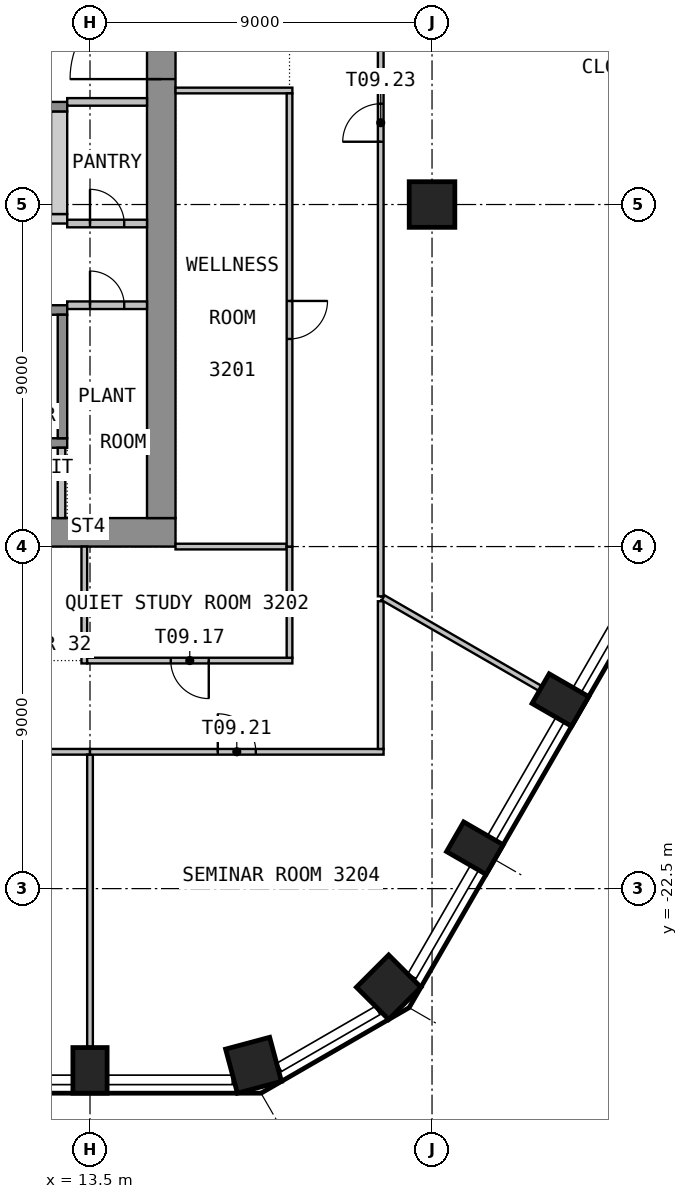
"""IFC4 building model, lengths in metres.
Left out: names, types, materials, properties, quantities, classifications, styles, units other than length and angle.
Written with IfcOpenShell. Run it as: python <this file> out.ifc"""

import sys

from ifc_helpers import new_model, si_unit, direction, frame, frame_2d, origin, origin_2d, place, context, subcontext, project, spatial, polyline, rectangle, circle, outline, extrude, element, fill, save


model = new_model("IFC4")
c1 = context("Model", 3, precision=1e-05, world=origin(), true_north=direction((0.0, 1.0)))
c2 = subcontext(c1, "Body", "Model", "MODEL_VIEW")
j1 = project(units=[si_unit("LENGTHUNIT", "METRE"), si_unit("PLANEANGLEUNIT", "RADIAN")], contexts=[c1])
p1 = place(None, origin())
s1 = spatial("IfcSite", under=j1, at=p1, CompositionType="ELEMENT")
p2 = place(p1, origin())
s2 = spatial("IfcBuilding", under=s1, at=p2, CompositionType="ELEMENT")
p3 = place(p2, frame((0.0, 0.0, 132.6)))
s3 = spatial("IfcBuildingStorey", under=s2, at=p3, CompositionType="ELEMENT", Elevation=132.6)
p4 = place(p3, frame((13.5, -27.283, 0.0), z_axis=(0.0, 0.0, 1.0), x_axis=(1.0, 0.0, 0.0)))
e1 = element("IfcColumn", 1, at=p4, inside=s3, PredefinedType="COLUMN", context=c2, shape_type="SweptSolid", body=[
    extrude(rectangle(XDim=0.9, YDim=1.2, at=origin_2d()), origin(), (0.0, 0.0, 1.0), 3.575),
])
for number, where, z_axis, x_axis in (
    (2, (17.803, -27.148, 0.0), (0.0, 0.0, 1.0), (0.966, 0.259, 0.0)),
    (3, (21.359, -25.095, 0.0), (0.0, 0.0, 1.0), (0.707, 0.707, 0.0)),
):
    element("IfcColumn", number, at=place(p3, frame(where, z_axis=z_axis, x_axis=x_axis)), inside=s3, PredefinedType="COLUMN", context=c2, shape_type="SweptSolid", body=[
        extrude(rectangle(XDim=1.2, YDim=1.2, at=origin_2d()), origin(), (0.0, 0.0, 1.0), 3.575),
    ])
for number, where, z_axis, x_axis in (
    (4, (23.627, -21.436, 0.0), (0.0, 0.0, 1.0), (0.5, 0.866, 0.0)),
    (5, (25.877, -17.539, 0.0), (0.0, 0.0, 1.0), (0.5, 0.866, 0.0)),
):
    element("IfcColumn", number, at=place(p3, frame(where, z_axis=z_axis, x_axis=x_axis)), inside=s3, PredefinedType="COLUMN", context=c2, shape_type="SweptSolid", body=[
        extrude(rectangle(XDim=0.9, YDim=1.2, at=origin_2d()), origin(), (0.0, 0.0, 1.0), 3.575),
    ])
p5 = place(p3, frame((22.5, -4.5, 0.0), z_axis=(0.0, 0.0, 1.0), x_axis=(1.0, 0.0, 0.0)))
e6 = element("IfcColumn", 6, at=p5, inside=s3, PredefinedType="COLUMN", context=c2, shape_type="SweptSolid", body=[
    extrude(circle(Radius=0.6, at=origin_2d()), origin(), (0.0, 0.0, 1.0), 3.575),
])
p6 = place(p3, frame((-15.75, -13.125, 0.0), z_axis=(0.0, 0.0, 1.0), x_axis=(1.0, 0.0, 0.0)))
e7 = element("IfcWall", 7, at=p6, inside=s3, PredefinedType="SHEAR", context=c2, shape_type="SweptSolid", body=[
    extrude(rectangle(XDim=31.5, YDim=0.75, at=frame_2d((15.75, 0.0))), origin(), (0.0, 0.0, 1.0), 3.575),
])
p7 = place(p6, frame((14.55, 0.0, 0.0)))
e8 = element("IfcOpeningElement", 8, at=p7, cuts=e7, PredefinedType="OPENING", context=c2, shape_type="SweptSolid", body=[
    extrude(rectangle(XDim=2.4, YDim=2.1, at=frame_2d((1.2, 1.05))), frame((0.0, 0.385, 0.0), z_axis=(0.0, -1.0, 0.0), x_axis=(1.0, 0.0, 0.0)), (0.0, 0.0, 1.0), 0.77),
])
p8 = place(p6, frame((3.3, 0.0, 0.0)))
e9 = element("IfcOpeningElement", 9, at=p8, cuts=e7, PredefinedType="OPENING", context=c2, shape_type="SweptSolid", body=[
    extrude(rectangle(XDim=1.2, YDim=2.1, at=frame_2d((0.6, 1.05))), frame((0.0, 0.385, 0.0), z_axis=(0.0, -1.0, 0.0), x_axis=(1.0, 0.0, 0.0)), (0.0, 0.0, 1.0), 0.77),
])
p9 = place(p6, frame((27.0, 0.0, 0.0)))
e10 = element("IfcOpeningElement", 10, at=p9, cuts=e7, PredefinedType="OPENING", context=c2, shape_type="SweptSolid", body=[
    extrude(rectangle(XDim=1.2, YDim=2.1, at=frame_2d((0.6, 1.05))), frame((0.0, 0.385, 0.0), z_axis=(0.0, -1.0, 0.0), x_axis=(1.0, 0.0, 0.0)), (0.0, 0.0, 1.0), 0.77),
])
p10 = place(p3, frame((15.375, -12.75, 0.0), z_axis=(0.0, 0.0, 1.0), x_axis=(0.0, 1.0, 0.0)))
e11 = element("IfcWall", 11, at=p10, inside=s3, PredefinedType="SHEAR", context=c2, shape_type="SweptSolid", body=[
    extrude(rectangle(XDim=25.5, YDim=0.75, at=frame_2d((12.75, 0.0))), origin(), (0.0, 0.0, 1.0), 3.575),
])
p11 = place(p10, frame((11.55, 0.0, 0.0)))
e12 = element("IfcOpeningElement", 12, at=p11, cuts=e11, PredefinedType="OPENING", context=c2, shape_type="SweptSolid", body=[
    extrude(rectangle(XDim=2.4, YDim=2.1, at=frame_2d((1.2, 1.05))), frame((0.0, 0.385, 0.0), z_axis=(0.0, -1.0, 0.0), x_axis=(1.0, 0.0, 0.0)), (0.0, 0.0, 1.0), 0.77),
])
p12 = place(p3, origin())
e13 = element("IfcWall", 13, at=p12, inside=s3, PredefinedType="SHEAR", context=c2, shape_type="SweptSolid", body=[
    extrude(outline(polyline([(-1.525, -5.0), (12.9, -5.0), (12.9, -4.75), (-1.525, -4.75), (-1.525, -5.0)])), origin(), (0.0, 0.0, 1.0), 3.575),
])
p13 = place(p3, origin())
e14 = element("IfcWall", 14, at=p13, inside=s3, PredefinedType="SHEAR", context=c2, shape_type="SweptSolid", body=[
    extrude(outline(polyline([(12.475, -4.75), (12.9, -4.75), (12.9, -2.05), (12.475, -2.05), (12.475, -4.75)])), origin(), (0.0, 0.0, 1.0), 3.575),
])
p14 = place(p3, frame((-1.525, -1.925, 0.0), z_axis=(0.0, 0.0, 1.0), x_axis=(1.0, 0.0, 0.0)))
e15 = element("IfcWall", 15, at=p14, inside=s3, PredefinedType="SHEAR", context=c2, shape_type="SweptSolid", body=[
    extrude(rectangle(XDim=14.425, YDim=0.25, at=frame_2d((7.212, 0.0))), origin(), (0.0, 0.0, 1.0), 3.575),
])
p15 = place(p14, frame((0.925, 0.0, 0.0)))
e16 = element("IfcOpeningElement", 16, at=p15, cuts=e15, PredefinedType="OPENING", context=c2, shape_type="SweptSolid", body=[
    extrude(rectangle(XDim=1.2, YDim=2.1, at=frame_2d((0.6, 1.05))), frame((0.0, 0.135, 0.0), z_axis=(0.0, -1.0, 0.0), x_axis=(1.0, 0.0, 0.0)), (0.0, 0.0, 1.0), 0.27),
])
p16 = place(p14, frame((3.725, 0.0, 0.0)))
e17 = element("IfcOpeningElement", 17, at=p16, cuts=e15, PredefinedType="OPENING", context=c2, shape_type="SweptSolid", body=[
    extrude(rectangle(XDim=1.2, YDim=2.1, at=frame_2d((0.6, 1.05))), frame((0.0, 0.135, 0.0), z_axis=(0.0, -1.0, 0.0), x_axis=(1.0, 0.0, 0.0)), (0.0, 0.0, 1.0), 0.27),
])
p17 = place(p3, frame((2.8, -10.775, 0.0), z_axis=(0.0, 0.0, 1.0), x_axis=(1.0, 0.0, 0.0)))
e18 = element("IfcWall", 18, at=p17, inside=s3, PredefinedType="SHEAR", context=c2, shape_type="SweptSolid", body=[
    extrude(rectangle(XDim=10.1, YDim=0.25, at=frame_2d((5.05, 0.0))), origin(), (0.0, 0.0, 1.0), 3.575),
])
p18 = place(p17, frame((8.45, 0.0, 0.0)))
e19 = element("IfcOpeningElement", 19, at=p18, cuts=e18, PredefinedType="OPENING", context=c2, shape_type="SweptSolid", body=[
    extrude(rectangle(XDim=1.2, YDim=2.1, at=frame_2d((0.6, 1.05))), frame((0.0, 0.135, 0.0), z_axis=(0.0, -1.0, 0.0), x_axis=(1.0, 0.0, 0.0)), (0.0, 0.0, 1.0), 0.27),
])
p19 = place(p3, frame((2.8, -7.275, 0.0), z_axis=(0.0, 0.0, 1.0), x_axis=(1.0, 0.0, 0.0)))
e20 = element("IfcWall", 20, at=p19, inside=s3, PredefinedType="SHEAR", context=c2, shape_type="SweptSolid", body=[
    extrude(rectangle(XDim=10.1, YDim=0.25, at=frame_2d((5.05, 0.0))), origin(), (0.0, 0.0, 1.0), 3.575),
])
p20 = place(p19, frame((8.45, 0.0, 0.0)))
e21 = element("IfcOpeningElement", 21, at=p20, cuts=e20, PredefinedType="OPENING", context=c2, shape_type="SweptSolid", body=[
    extrude(rectangle(XDim=1.2, YDim=2.1, at=frame_2d((0.6, 1.05))), frame((0.0, 0.135, 0.0), z_axis=(0.0, -1.0, 0.0), x_axis=(1.0, 0.0, 0.0)), (0.0, 0.0, 1.0), 0.27),
])
p21 = place(p3, frame((12.775, -10.65, 0.0), z_axis=(0.0, 0.0, 1.0), x_axis=(0.0, 1.0, 0.0)))
e22 = element("IfcWall", 22, at=p21, inside=s3, PredefinedType="SHEAR", context=c2, shape_type="SweptSolid", body=[
    extrude(rectangle(XDim=3.25, YDim=0.25, at=frame_2d((1.625, 0.0))), origin(), (0.0, 0.0, 1.0), 3.575),
])
p22 = place(p3, frame((12.75, -12.75, 0.0), z_axis=(0.0, 0.0, 1.0), x_axis=(0.0, 1.0, 0.0)))
e23 = element("IfcWall", 23, at=p22, inside=s3, PredefinedType="PARTITIONING", context=c2, shape_type="SweptSolid", body=[
    extrude(rectangle(XDim=1.85, YDim=0.2, at=frame_2d((0.925, 0.0))), origin(), (0.0, 0.0, 1.0), 3.575),
])
p23 = place(p3, frame((12.9, -7.15, 0.0), z_axis=(0.0, 0.0, 1.0), x_axis=(1.0, 0.0, 0.0)))
e24 = element("IfcWall", 24, at=p23, inside=s3, PredefinedType="PARTITIONING", context=c2, shape_type="SweptSolid", body=[
    extrude(rectangle(XDim=2.1, YDim=0.2, at=frame_2d((1.05, 0.0))), origin(), (0.0, 0.0, 1.0), 3.575),
])
p24 = place(p23, frame((0.6, 0.0, 0.0)))
e25 = element("IfcOpeningElement", 25, at=p24, cuts=e24, PredefinedType="OPENING", context=c2, shape_type="SweptSolid", body=[
    extrude(rectangle(XDim=0.9, YDim=2.1, at=frame_2d((0.45, 1.05))), frame((0.0, 0.11, 0.0), z_axis=(0.0, -1.0, 0.0), x_axis=(1.0, 0.0, 0.0)), (0.0, 0.0, 1.0), 0.22),
])
p25 = place(p3, frame((12.9, -5.0, 0.0), z_axis=(0.0, 0.0, 1.0), x_axis=(1.0, 0.0, 0.0)))
e26 = element("IfcWall", 26, at=p25, inside=s3, PredefinedType="PARTITIONING", context=c2, shape_type="SweptSolid", body=[
    extrude(rectangle(XDim=2.1, YDim=0.2, at=frame_2d((1.05, 0.0))), origin(), (0.0, 0.0, 1.0), 3.575),
])
p26 = place(p25, frame((0.6, 0.0, 0.0)))
e27 = element("IfcOpeningElement", 27, at=p26, cuts=e26, PredefinedType="OPENING", context=c2, shape_type="SweptSolid", body=[
    extrude(rectangle(XDim=0.9, YDim=2.1, at=frame_2d((0.45, 1.05))), frame((0.0, 0.11, 0.0), z_axis=(0.0, -1.0, 0.0), x_axis=(1.0, 0.0, 0.0)), (0.0, 0.0, 1.0), 0.22),
])
p27 = place(p3, frame((12.9, -1.8, 0.0), z_axis=(0.0, 0.0, 1.0), x_axis=(1.0, 0.0, 0.0)))
e28 = element("IfcWall", 28, at=p27, inside=s3, PredefinedType="PARTITIONING", context=c2, shape_type="SweptSolid", body=[
    extrude(rectangle(XDim=2.1, YDim=0.2, at=frame_2d((1.05, 0.0))), origin(), (0.0, 0.0, 1.0), 3.575),
])
p28 = place(p3, frame((-4.5, -18.9, 0.0), z_axis=(0.0, 0.0, 1.0), x_axis=(1.0, 0.0, 0.0)))
e29 = element("IfcWall", 29, at=p28, inside=s3, PredefinedType="PARTITIONING", context=c2, shape_type="SweptSolid", body=[
    extrude(rectangle(XDim=18.0, YDim=0.15, at=frame_2d((9.0, 0.0))), origin(), (0.0, 0.0, 1.0), 3.575),
])
p29 = place(p28, frame((8.5, 0.0, 0.0)))
e30 = element("IfcOpeningElement", 30, at=p29, cuts=e29, PredefinedType="OPENING", context=c2, shape_type="SweptSolid", body=[
    extrude(rectangle(XDim=1.0, YDim=2.1, at=frame_2d((0.5, 1.05))), frame((0.0, 0.085, 0.0), z_axis=(0.0, -1.0, 0.0), x_axis=(1.0, 0.0, 0.0)), (0.0, 0.0, 1.0), 0.17),
])
p30 = place(p3, frame((13.35, -16.575, 0.0), z_axis=(0.0, 0.0, 1.0), x_axis=(0.0, 1.0, 0.0)))
e31 = element("IfcWall", 31, at=p30, inside=s3, PredefinedType="PARTITIONING", context=c2, shape_type="SweptSolid", body=[
    extrude(rectangle(XDim=3.075, YDim=0.15, at=frame_2d((1.538, 0.0))), origin(), (0.0, 0.0, 1.0), 3.575),
])
p31 = place(p3, frame((18.825, -16.5, 0.0), z_axis=(0.0, 0.0, 1.0), x_axis=(-1.0, 0.0, 0.0)))
e32 = element("IfcWall", 32, at=p31, inside=s3, PredefinedType="PARTITIONING", context=c2, shape_type="SweptSolid", body=[
    extrude(rectangle(XDim=5.4, YDim=0.15, at=frame_2d((2.7, 0.0))), origin(), (0.0, 0.0, 1.0), 3.575),
])
p32 = place(p31, frame((2.2, 0.0, 0.0)))
e33 = element("IfcOpeningElement", 33, at=p32, cuts=e32, PredefinedType="OPENING", context=c2, shape_type="SweptSolid", body=[
    extrude(rectangle(XDim=1.0, YDim=2.1, at=frame_2d((0.5, 1.05))), frame((0.0, 0.085, 0.0), z_axis=(0.0, -1.0, 0.0), x_axis=(1.0, 0.0, 0.0)), (0.0, 0.0, 1.0), 0.17),
])
p33 = place(p3, frame((13.5, -18.975, 0.0), z_axis=(0.0, 0.0, 1.0), x_axis=(0.0, -1.0, 0.0)))
e34 = element("IfcWall", 34, at=p33, inside=s3, PredefinedType="PARTITIONING", context=c2, shape_type="SweptSolid", body=[
    extrude(rectangle(XDim=7.688, YDim=0.15, at=frame_2d((3.844, 0.0))), origin(), (0.0, 0.0, 1.0), 3.575),
])
p34 = place(p3, frame((13.5, -18.9, 0.0), z_axis=(0.0, 0.0, 1.0), x_axis=(1.0, 0.0, 0.0)))
e35 = element("IfcWall", 35, at=p34, inside=s3, PredefinedType="PARTITIONING", context=c2, shape_type="SweptSolid", body=[
    extrude(rectangle(XDim=7.725, YDim=0.15, at=frame_2d((3.863, 0.0))), origin(), (0.0, 0.0, 1.0), 3.575),
])
p35 = place(p34, frame((3.363, 0.0, 0.0)))
e36 = element("IfcOpeningElement", 36, at=p35, cuts=e35, PredefinedType="OPENING", context=c2, shape_type="SweptSolid", body=[
    extrude(rectangle(XDim=1.0, YDim=2.1, at=frame_2d((0.5, 1.05))), frame((0.0, 0.085, 0.0), z_axis=(0.0, -1.0, 0.0), x_axis=(1.0, 0.0, 0.0)), (0.0, 0.0, 1.0), 0.17),
])
p36 = place(p3, frame((15.75, -13.5, 0.0), z_axis=(0.0, 0.0, 1.0), x_axis=(1.0, 0.0, 0.0)))
e37 = element("IfcWall", 37, at=p36, inside=s3, PredefinedType="PARTITIONING", context=c2, shape_type="SweptSolid", body=[
    extrude(rectangle(XDim=2.925, YDim=0.15, at=frame_2d((1.462, 0.0))), origin(), (0.0, 0.0, 1.0), 3.575),
])
p37 = place(p3, frame((15.75, -1.5, 0.0), z_axis=(0.0, 0.0, 1.0), x_axis=(1.0, 0.0, 0.0)))
e38 = element("IfcWall", 38, at=p37, inside=s3, PredefinedType="PARTITIONING", context=c2, shape_type="SweptSolid", body=[
    extrude(rectangle(XDim=3.075, YDim=0.15, at=frame_2d((1.538, 0.0))), origin(), (0.0, 0.0, 1.0), 3.575),
])
p38 = place(p3, frame((18.75, -13.5, 0.0), z_axis=(0.0, 0.0, 1.0), x_axis=(0.0, -1.0, 0.0)))
e39 = element("IfcWall", 39, at=p38, inside=s3, PredefinedType="PARTITIONING", context=c2, shape_type="SweptSolid", body=[
    extrude(rectangle(XDim=2.925, YDim=0.15, at=frame_2d((1.462, 0.0))), origin(), (0.0, 0.0, 1.0), 3.575),
])
p39 = place(p3, frame((18.75, -1.575, 0.0), z_axis=(0.0, 0.0, 1.0), x_axis=(0.0, -1.0, 0.0)))
e40 = element("IfcWall", 40, at=p39, inside=s3, PredefinedType="PARTITIONING", context=c2, shape_type="SweptSolid", body=[
    extrude(rectangle(XDim=11.925, YDim=0.15, at=frame_2d((5.962, 0.0))), origin(), (0.0, 0.0, 1.0), 3.575),
])
p40 = place(p39, frame((5.462, 0.0, 0.0)))
e41 = element("IfcOpeningElement", 41, at=p40, cuts=e40, PredefinedType="OPENING", context=c2, shape_type="SweptSolid", body=[
    extrude(rectangle(XDim=1.0, YDim=2.1, at=frame_2d((0.5, 1.05))), frame((0.0, 0.085, 0.0), z_axis=(0.0, -1.0, 0.0), x_axis=(1.0, 0.0, 0.0)), (0.0, 0.0, 1.0), 0.17),
])
p41 = place(p3, frame((21.15, -18.825, 0.0), z_axis=(0.0, 0.0, 1.0), x_axis=(0.0, 1.0, 0.0)))
e42 = element("IfcWall", 42, at=p41, inside=s3, PredefinedType="PARTITIONING", context=c2, shape_type="SweptSolid", body=[
    extrude(rectangle(XDim=3.886, YDim=0.15, at=frame_2d((1.943, 0.0))), origin(), (0.0, 0.0, 1.0), 3.575),
])
p42 = place(p3, frame((21.15, -14.809, 0.0), z_axis=(0.0, 0.0, 1.0), x_axis=(0.0, 1.0, 0.0)))
e43 = element("IfcWall", 43, at=p42, inside=s3, PredefinedType="PARTITIONING", context=c2, shape_type="SweptSolid", body=[
    extrude(rectangle(XDim=24.422, YDim=0.15, at=frame_2d((12.211, 0.0))), origin(), (0.0, 0.0, 1.0), 3.575),
])
p43 = place(p42, frame((11.961, 0.0, 0.0)))
e44 = element("IfcOpeningElement", 44, at=p43, cuts=e43, PredefinedType="OPENING", context=c2, shape_type="SweptSolid", body=[
    extrude(rectangle(XDim=1.0, YDim=2.1, at=frame_2d((0.5, 1.05))), frame((0.0, 0.085, 0.0), z_axis=(0.0, -1.0, 0.0), x_axis=(1.0, 0.0, 0.0)), (0.0, 0.0, 1.0), 0.17),
])
p44 = place(p3, frame((21.215, -14.846, 0.0), z_axis=(0.0, 0.0, 1.0), x_axis=(0.866039654489, -0.499975316243, 0.0)))
e45 = element("IfcWall", 45, at=p44, inside=s3, PredefinedType="PARTITIONING", context=c2, shape_type="SweptSolid", body=[
    extrude(rectangle(XDim=4.764, YDim=0.15, at=frame_2d((2.382, 0.0))), origin(), (0.0, 0.0, 1.0), 3.575),
])
p45 = place(p11, origin())
e46 = element("IfcDoor", 46, at=p45, inside=s3, OperationType="DOUBLE_DOOR_DOUBLE_SWING", PredefinedType="DOOR", context=c2, shape_type="SweptSolid", body=[
    extrude(rectangle(XDim=2.4, YDim=2.1, at=frame_2d((1.2, 1.05))), frame((0.0, 0.025, 0.0), z_axis=(0.0, -1.0, 0.0), x_axis=(1.0, 0.0, 0.0)), (0.0, 0.0, 1.0), 0.05),
])
fill(e12, e46)
p46 = place(p24, origin())
e47 = element("IfcDoor", 47, at=p46, inside=s3, OperationType="SINGLE_SWING_LEFT", PredefinedType="DOOR", context=c2, shape_type="SweptSolid", body=[
    extrude(rectangle(XDim=0.9, YDim=2.1, at=frame_2d((0.45, 1.05))), frame((0.0, 0.025, 0.0), z_axis=(0.0, -1.0, 0.0), x_axis=(1.0, 0.0, 0.0)), (0.0, 0.0, 1.0), 0.05),
])
fill(e25, e47)
p47 = place(p26, origin())
e48 = element("IfcDoor", 48, at=p47, inside=s3, OperationType="SINGLE_SWING_LEFT", PredefinedType="DOOR", context=c2, shape_type="SweptSolid", body=[
    extrude(rectangle(XDim=0.9, YDim=2.1, at=frame_2d((0.45, 1.05))), frame((0.0, 0.025, 0.0), z_axis=(0.0, -1.0, 0.0), x_axis=(1.0, 0.0, 0.0)), (0.0, 0.0, 1.0), 0.05),
])
fill(e27, e48)
p48 = place(p32, origin())
e49 = element("IfcDoor", 49, at=p48, inside=s3, OperationType="SINGLE_SWING_RIGHT", PredefinedType="DOOR", context=c2, shape_type="SweptSolid", body=[
    extrude(rectangle(XDim=1.0, YDim=2.1, at=frame_2d((0.5, 1.05))), frame((0.0, 0.025, 0.0), z_axis=(0.0, -1.0, 0.0), x_axis=(1.0, 0.0, 0.0)), (0.0, 0.0, 1.0), 0.05),
])
fill(e33, e49)
p49 = place(p40, origin())
e50 = element("IfcDoor", 50, at=p49, inside=s3, OperationType="SINGLE_SWING_RIGHT", PredefinedType="DOOR", context=c2, shape_type="SweptSolid", body=[
    extrude(rectangle(XDim=1.0, YDim=2.1, at=frame_2d((0.5, 1.05))), frame((0.0, 0.025, 0.0), z_axis=(0.0, -1.0, 0.0), x_axis=(1.0, 0.0, 0.0)), (0.0, 0.0, 1.0), 0.05),
])
fill(e41, e50)
p50 = place(p35, origin())
e51 = element("IfcDoor", 51, at=p50, inside=s3, OperationType="SINGLE_SWING_LEFT", PredefinedType="DOOR", context=c2, shape_type="SweptSolid", body=[
    extrude(rectangle(XDim=1.0, YDim=2.1, at=frame_2d((0.5, 1.05))), frame((0.0, 0.025, 0.0), z_axis=(0.0, -1.0, 0.0), x_axis=(1.0, 0.0, 0.0)), (0.0, 0.0, 1.0), 0.05),
])
fill(e36, e51)
p51 = place(p43, origin())
e52 = element("IfcDoor", 52, at=p51, inside=s3, OperationType="SINGLE_SWING_LEFT", PredefinedType="DOOR", context=c2, shape_type="SweptSolid", body=[
    extrude(rectangle(XDim=1.0, YDim=2.1, at=frame_2d((0.5, 1.05))), frame((0.0, 0.025, 0.0), z_axis=(0.0, -1.0, 0.0), x_axis=(1.0, 0.0, 0.0)), (0.0, 0.0, 1.0), 0.05),
])
fill(e44, e52)
save(model, sys.argv[1])
